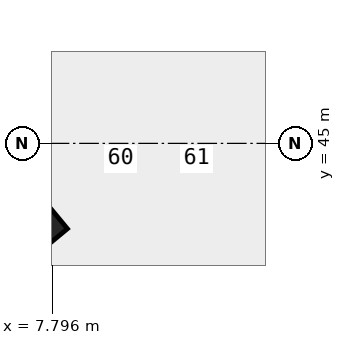
"""IFC4 building model, lengths in metres.
Left out: names, types, materials, properties, quantities, classifications, styles, units other than length and angle.
Written with IfcOpenShell. Run it as: python <this file> out.ifc"""

import sys

from ifc_helpers import new_model, si_unit, direction, frame, origin, origin_2d, place, context, subcontext, project, spatial, rectangle, extrude, element, save


model = new_model("IFC4")
c1 = context("Model", 3, precision=1e-05, world=origin(), true_north=direction((0.0, 1.0)))
c2 = subcontext(c1, "Body", "Model", "MODEL_VIEW")
j1 = project(units=[si_unit("LENGTHUNIT", "METRE"), si_unit("PLANEANGLEUNIT", "RADIAN")], contexts=[c1])
p1 = place(None, origin())
s1 = spatial("IfcSite", under=j1, at=p1, CompositionType="ELEMENT")
p2 = place(p1, origin())
s2 = spatial("IfcBuilding", under=s1, at=p2, CompositionType="ELEMENT")
p3 = place(p2, frame((0.0, 0.0, -11.0)))
s3 = spatial("IfcBuildingStorey", under=s2, at=p3, CompositionType="ELEMENT", Elevation=-11.0)
p4 = place(p3, frame((7.299, 42.144, -0.42), z_axis=(0.0, 0.0, 1.0), x_axis=(-0.637666022163, 0.770312952103, 0.0)))
e1 = element("IfcColumn", 1, at=p4, inside=s3, PredefinedType="COLUMN", context=c2, shape_type="SweptSolid", body=[
    extrude(rectangle(XDim=1.2, YDim=1.6, at=origin_2d()), origin(), (0.0, 0.0, 1.0), 5.5),
])
save(model, sys.argv[1])
